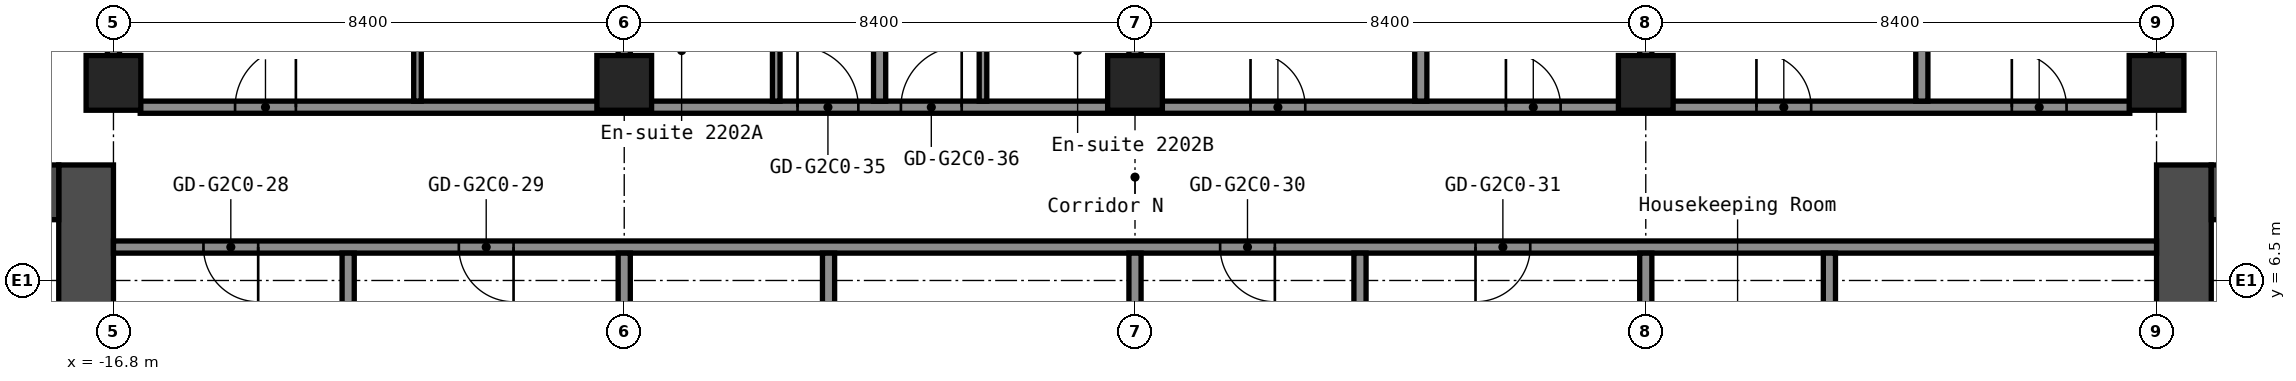
"""IFC4 building model, lengths in metres.
Left out: names, types, materials, properties, quantities, classifications, styles, units other than length and angle.
Written with IfcOpenShell. Run it as: python <this file> out.ifc"""

import sys

from ifc_helpers import new_model, si_unit, direction, frame, frame_2d, origin, origin_2d, place, context, subcontext, project, spatial, rectangle, hollow_rectangle, extrude, element, fill, save


model = new_model("IFC4")
c1 = context("Model", 3, precision=1e-05, world=origin(), true_north=direction((0.0, 1.0)))
c2 = subcontext(c1, "Body", "Model", "MODEL_VIEW")
j1 = project(units=[si_unit("LENGTHUNIT", "METRE"), si_unit("PLANEANGLEUNIT", "RADIAN")], contexts=[c1])
p1 = place(None, origin())
s1 = spatial("IfcSite", under=j1, at=p1, CompositionType="ELEMENT")
p2 = place(p1, origin())
s2 = spatial("IfcBuilding", under=s1, at=p2, CompositionType="ELEMENT")
p3 = place(p2, frame((0.0, 0.0, 81.8)))
s3 = spatial("IfcBuildingStorey", under=s2, at=p3, CompositionType="ELEMENT", Elevation=81.8)
for number, where, z_axis, x_axis in (
    (1, (-16.8, 9.75, 0.0), (0.0, 0.0, 1.0), (1.0, 0.0, 0.0)),
    (2, (-8.4, 9.75, 0.0), (0.0, 0.0, 1.0), (1.0, 0.0, 0.0)),
    (3, (0.0, 9.75, 0.0), (0.0, 0.0, 1.0), (1.0, 0.0, 0.0)),
    (4, (8.4, 9.75, 0.0), (0.0, 0.0, 1.0), (1.0, 0.0, 0.0)),
    (5, (16.8, 9.75, 0.0), (0.0, 0.0, 1.0), (1.0, 0.0, 0.0)),
):
    element("IfcColumn", number, at=place(p3, frame(where, z_axis=z_axis, x_axis=x_axis)), inside=s3, PredefinedType="COLUMN", context=c2, shape_type="SweptSolid", body=[
        extrude(hollow_rectangle(XDim=0.9, YDim=0.9, WallThickness=0.036, at=origin_2d()), origin(), (0.0, 0.0, 1.0), 2.8),
    ])
p4 = place(p3, frame((-17.25, -8.4, 0.0), z_axis=(0.0, 0.0, 1.0), x_axis=(0.0, 1.0, 0.0)))
e6 = element("IfcWall", 6, at=p4, inside=s3, PredefinedType="SHEAR", context=c2, shape_type="SweptSolid", body=[
    extrude(rectangle(XDim=16.8, YDim=0.9, at=frame_2d((8.4, 0.0))), origin(), (0.0, 0.0, 1.0), 2.8),
])
p5 = place(p4, frame((7.6, 0.0, 0.0)))
e7 = element("IfcOpeningElement", 7, at=p5, cuts=e6, PredefinedType="OPENING", context=c2, shape_type="SweptSolid", body=[
    extrude(rectangle(XDim=1.2, YDim=2.1, at=frame_2d((0.6, 1.05))), frame((0.0, 0.46, 0.0), z_axis=(0.0, -1.0, 0.0), x_axis=(1.0, 0.0, 0.0)), (0.0, 0.0, 1.0), 0.92),
])
p6 = place(p3, frame((-32.7, 7.95, 0.0), z_axis=(0.0, 0.0, 1.0), x_axis=(1.0, 0.0, 0.0)))
e8 = element("IfcWall", 8, at=p6, inside=s3, PredefinedType="SHEAR", context=c2, shape_type="SweptSolid", body=[
    extrude(rectangle(XDim=15.0, YDim=0.9, at=frame_2d((7.5, 0.0))), origin(), (0.0, 0.0, 1.0), 2.8),
])
p7 = place(p6, frame((3.4, 0.0, 0.0)))
e9 = element("IfcOpeningElement", 9, at=p7, cuts=e8, PredefinedType="OPENING", context=c2, shape_type="SweptSolid", body=[
    extrude(rectangle(XDim=1.2, YDim=2.1, at=frame_2d((0.6, 1.05))), frame((0.0, 0.46, 0.0), z_axis=(0.0, -1.0, 0.0), x_axis=(1.0, 0.0, 0.0)), (0.0, 0.0, 1.0), 0.92),
])
p8 = place(p6, frame((0.75, 0.0, 0.0)))
e10 = element("IfcOpeningElement", 10, at=p8, cuts=e8, PredefinedType="OPENING", context=c2, shape_type="SweptSolid", body=[
    extrude(rectangle(XDim=0.9, YDim=2.1, at=frame_2d((0.45, 1.05))), frame((0.0, 0.46, 0.0), z_axis=(0.0, -1.0, 0.0), x_axis=(1.0, 0.0, 0.0)), (0.0, 0.0, 1.0), 0.92),
])
p9 = place(p3, frame((17.25, -8.4, 0.0), z_axis=(0.0, 0.0, 1.0), x_axis=(0.0, 1.0, 0.0)))
e11 = element("IfcWall", 11, at=p9, inside=s3, PredefinedType="SHEAR", context=c2, shape_type="SweptSolid", body=[
    extrude(rectangle(XDim=16.8, YDim=0.9, at=frame_2d((8.4, 0.0))), origin(), (0.0, 0.0, 1.0), 2.8),
])
p10 = place(p9, frame((7.6, 0.0, 0.0)))
e12 = element("IfcOpeningElement", 12, at=p10, cuts=e11, PredefinedType="OPENING", context=c2, shape_type="SweptSolid", body=[
    extrude(rectangle(XDim=1.2, YDim=2.1, at=frame_2d((0.6, 1.05))), frame((0.0, 0.46, 0.0), z_axis=(0.0, -1.0, 0.0), x_axis=(1.0, 0.0, 0.0)), (0.0, 0.0, 1.0), 0.92),
])
p11 = place(p3, frame((17.7, 7.95, 0.0), z_axis=(0.0, 0.0, 1.0), x_axis=(1.0, 0.0, 0.0)))
e13 = element("IfcWall", 13, at=p11, inside=s3, PredefinedType="SHEAR", context=c2, shape_type="SweptSolid", body=[
    extrude(rectangle(XDim=15.0, YDim=0.9, at=frame_2d((7.5, 0.0))), origin(), (0.0, 0.0, 1.0), 2.8),
])
p12 = place(p11, frame((10.4, 0.0, 0.0)))
e14 = element("IfcOpeningElement", 14, at=p12, cuts=e13, PredefinedType="OPENING", context=c2, shape_type="SweptSolid", body=[
    extrude(rectangle(XDim=1.2, YDim=2.1, at=frame_2d((0.6, 1.05))), frame((0.0, 0.46, 0.0), z_axis=(0.0, -1.0, 0.0), x_axis=(1.0, 0.0, 0.0)), (0.0, 0.0, 1.0), 0.92),
])
p13 = place(p11, frame((13.35, 0.0, 0.0)))
e15 = element("IfcOpeningElement", 15, at=p13, cuts=e13, PredefinedType="OPENING", context=c2, shape_type="SweptSolid", body=[
    extrude(rectangle(XDim=0.9, YDim=2.1, at=frame_2d((0.45, 1.05))), frame((0.0, 0.46, 0.0), z_axis=(0.0, -1.0, 0.0), x_axis=(1.0, 0.0, 0.0)), (0.0, 0.0, 1.0), 0.92),
])
p14 = place(p3, frame((-16.8, 7.05, 0.0), z_axis=(0.0, 0.0, 1.0), x_axis=(1.0, 0.0, 0.0)))
e16 = element("IfcWall", 16, at=p14, inside=s3, PredefinedType="PARTITIONING", context=c2, shape_type="SweptSolid", body=[
    extrude(rectangle(XDim=33.6, YDim=0.2, at=frame_2d((16.8, 0.0))), origin(), (0.0, 0.0, 1.0), 2.8),
])
p15 = place(p14, frame((1.48, 0.0, 0.0)))
e17 = element("IfcOpeningElement", 17, at=p15, cuts=e16, PredefinedType="OPENING", context=c2, shape_type="SweptSolid", body=[
    extrude(rectangle(XDim=0.9, YDim=2.1, at=frame_2d((0.45, 1.05))), frame((0.0, 0.11, 0.0), z_axis=(0.0, -1.0, 0.0), x_axis=(1.0, 0.0, 0.0)), (0.0, 0.0, 1.0), 0.22),
])
p16 = place(p14, frame((5.68, 0.0, 0.0)))
e18 = element("IfcOpeningElement", 18, at=p16, cuts=e16, PredefinedType="OPENING", context=c2, shape_type="SweptSolid", body=[
    extrude(rectangle(XDim=0.9, YDim=2.1, at=frame_2d((0.45, 1.05))), frame((0.0, 0.11, 0.0), z_axis=(0.0, -1.0, 0.0), x_axis=(1.0, 0.0, 0.0)), (0.0, 0.0, 1.0), 0.22),
])
p17 = place(p14, frame((18.2, 0.0, 0.0)))
e19 = element("IfcOpeningElement", 19, at=p17, cuts=e16, PredefinedType="OPENING", context=c2, shape_type="SweptSolid", body=[
    extrude(rectangle(XDim=0.9, YDim=2.1, at=frame_2d((0.45, 1.05))), frame((0.0, 0.11, 0.0), z_axis=(0.0, -1.0, 0.0), x_axis=(1.0, 0.0, 0.0)), (0.0, 0.0, 1.0), 0.22),
])
p18 = place(p14, frame((22.4, 0.0, 0.0)))
e20 = element("IfcOpeningElement", 20, at=p18, cuts=e16, PredefinedType="OPENING", context=c2, shape_type="SweptSolid", body=[
    extrude(rectangle(XDim=0.9, YDim=2.1, at=frame_2d((0.45, 1.05))), frame((0.0, 0.11, 0.0), z_axis=(0.0, -1.0, 0.0), x_axis=(1.0, 0.0, 0.0)), (0.0, 0.0, 1.0), 0.22),
])
p19 = place(p3, frame((-16.36, 9.35, 0.0), z_axis=(0.0, 0.0, 1.0), x_axis=(1.0, 0.0, 0.0)))
e21 = element("IfcWall", 21, at=p19, inside=s3, PredefinedType="PARTITIONING", context=c2, shape_type="SweptSolid", body=[
    extrude(rectangle(XDim=32.72, YDim=0.2, at=frame_2d((16.36, 0.0))), origin(), (0.0, 0.0, 1.0), 2.8),
])
p20 = place(p19, frame((1.56, 0.0, 0.0)))
e22 = element("IfcOpeningElement", 22, at=p20, cuts=e21, PredefinedType="OPENING", context=c2, shape_type="SweptSolid", body=[
    extrude(rectangle(XDim=1.0, YDim=2.1, at=frame_2d((0.5, 1.05))), frame((0.0, 0.11, 0.0), z_axis=(0.0, -1.0, 0.0), x_axis=(1.0, 0.0, 0.0)), (0.0, 0.0, 1.0), 0.22),
])
p21 = place(p19, frame((10.81, 0.0, 0.0)))
e23 = element("IfcOpeningElement", 23, at=p21, cuts=e21, PredefinedType="OPENING", context=c2, shape_type="SweptSolid", body=[
    extrude(rectangle(XDim=1.0, YDim=2.1, at=frame_2d((0.5, 1.05))), frame((0.0, 0.11, 0.0), z_axis=(0.0, -1.0, 0.0), x_axis=(1.0, 0.0, 0.0)), (0.0, 0.0, 1.0), 0.22),
])
p22 = place(p19, frame((12.51, 0.0, 0.0)))
e24 = element("IfcOpeningElement", 24, at=p22, cuts=e21, PredefinedType="OPENING", context=c2, shape_type="SweptSolid", body=[
    extrude(rectangle(XDim=1.0, YDim=2.1, at=frame_2d((0.5, 1.05))), frame((0.0, 0.11, 0.0), z_axis=(0.0, -1.0, 0.0), x_axis=(1.0, 0.0, 0.0)), (0.0, 0.0, 1.0), 0.22),
])
p23 = place(p19, frame((18.26, 0.0, 0.0)))
e25 = element("IfcOpeningElement", 25, at=p23, cuts=e21, PredefinedType="OPENING", context=c2, shape_type="SweptSolid", body=[
    extrude(rectangle(XDim=0.9, YDim=2.1, at=frame_2d((0.45, 1.05))), frame((0.0, 0.11, 0.0), z_axis=(0.0, -1.0, 0.0), x_axis=(1.0, 0.0, 0.0)), (0.0, 0.0, 1.0), 0.22),
])
p24 = place(p19, frame((22.46, 0.0, 0.0)))
e26 = element("IfcOpeningElement", 26, at=p24, cuts=e21, PredefinedType="OPENING", context=c2, shape_type="SweptSolid", body=[
    extrude(rectangle(XDim=0.9, YDim=2.1, at=frame_2d((0.45, 1.05))), frame((0.0, 0.11, 0.0), z_axis=(0.0, -1.0, 0.0), x_axis=(1.0, 0.0, 0.0)), (0.0, 0.0, 1.0), 0.22),
])
p25 = place(p19, frame((26.58, 0.0, 0.0)))
e27 = element("IfcOpeningElement", 27, at=p25, cuts=e21, PredefinedType="OPENING", context=c2, shape_type="SweptSolid", body=[
    extrude(rectangle(XDim=0.9, YDim=2.1, at=frame_2d((0.45, 1.05))), frame((0.0, 0.11, 0.0), z_axis=(0.0, -1.0, 0.0), x_axis=(1.0, 0.0, 0.0)), (0.0, 0.0, 1.0), 0.22),
])
p26 = place(p19, frame((30.78, 0.0, 0.0)))
e28 = element("IfcOpeningElement", 28, at=p26, cuts=e21, PredefinedType="OPENING", context=c2, shape_type="SweptSolid", body=[
    extrude(rectangle(XDim=0.9, YDim=2.1, at=frame_2d((0.45, 1.05))), frame((0.0, 0.11, 0.0), z_axis=(0.0, -1.0, 0.0), x_axis=(1.0, 0.0, 0.0)), (0.0, 0.0, 1.0), 0.22),
])
p27 = place(p3, frame((-16.8, 10.19, 0.0), z_axis=(0.0, 0.0, 1.0), x_axis=(0.0, 1.0, 0.0)))
e29 = element("IfcWall", 29, at=p27, inside=s3, PredefinedType="PARTITIONING", context=c2, shape_type="SweptSolid", body=[
    extrude(rectangle(XDim=13.36, YDim=0.2, at=frame_2d((6.68, 0.0))), origin(), (0.0, 0.0, 1.0), 2.8),
])
p28 = place(p3, frame((-12.94, 1.05, 0.0), z_axis=(0.0, 0.0, 1.0), x_axis=(0.0, 1.0, 0.0)))
e30 = element("IfcWall", 30, at=p28, inside=s3, PredefinedType="PARTITIONING", context=c2, shape_type="SweptSolid", body=[
    extrude(rectangle(XDim=5.9, YDim=0.2, at=frame_2d((2.95, 0.0))), origin(), (0.0, 0.0, 1.0), 2.8),
])
p29 = place(p3, frame((-11.8, 9.45, 0.0), z_axis=(0.0, 0.0, 1.0), x_axis=(0.0, 1.0, 0.0)))
e31 = element("IfcWall", 31, at=p29, inside=s3, PredefinedType="PARTITIONING", context=c2, shape_type="SweptSolid", body=[
    extrude(rectangle(XDim=3.3, YDim=0.125, at=frame_2d((1.65, 0.0))), origin(), (0.0, 0.0, 1.0), 2.8),
])
p30 = place(p3, frame((-8.4, 1.05, 0.0), z_axis=(0.0, 0.0, 1.0), x_axis=(0.0, 1.0, 0.0)))
e32 = element("IfcWall", 32, at=p30, inside=s3, PredefinedType="PARTITIONING", context=c2, shape_type="SweptSolid", body=[
    extrude(rectangle(XDim=5.9, YDim=0.2, at=frame_2d((2.95, 0.0))), origin(), (0.0, 0.0, 1.0), 2.8),
])
p31 = place(p3, frame((-8.4, 10.19, 0.0), z_axis=(0.0, 0.0, 1.0), x_axis=(0.0, 1.0, 0.0)))
e33 = element("IfcWall", 33, at=p31, inside=s3, PredefinedType="PARTITIONING", context=c2, shape_type="SweptSolid", body=[
    extrude(rectangle(XDim=13.36, YDim=0.2, at=frame_2d((6.68, 0.0))), origin(), (0.0, 0.0, 1.0), 2.8),
])
p32 = place(p3, frame((-5.9, 9.45, 0.0), z_axis=(0.0, 0.0, 1.0), x_axis=(0.0, 1.0, 0.0)))
e34 = element("IfcWall", 34, at=p32, inside=s3, PredefinedType="PARTITIONING", context=c2, shape_type="SweptSolid", body=[
    extrude(rectangle(XDim=2.9, YDim=0.125, at=frame_2d((1.45, 0.0))), origin(), (0.0, 0.0, 1.0), 2.8),
])
p33 = place(p32, frame((1.5, 0.0, 0.0)))
e35 = element("IfcOpeningElement", 35, at=p33, cuts=e34, PredefinedType="OPENING", context=c2, shape_type="SweptSolid", body=[
    extrude(rectangle(XDim=0.8, YDim=2.1, at=frame_2d((0.4, 1.05))), frame((0.0, 0.073, 0.0), z_axis=(0.0, -1.0, 0.0), x_axis=(1.0, 0.0, 0.0)), (0.0, 0.0, 1.0), 0.145),
])
p34 = place(p3, frame((-5.04, 1.05, 0.0), z_axis=(0.0, 0.0, 1.0), x_axis=(0.0, 1.0, 0.0)))
e36 = element("IfcWall", 36, at=p34, inside=s3, PredefinedType="PARTITIONING", context=c2, shape_type="SweptSolid", body=[
    extrude(rectangle(XDim=5.9, YDim=0.2, at=frame_2d((2.95, 0.0))), origin(), (0.0, 0.0, 1.0), 2.8),
])
p35 = place(p3, frame((-4.2, 9.45, 0.0), z_axis=(0.0, 0.0, 1.0), x_axis=(0.0, 1.0, 0.0)))
e37 = element("IfcWall", 37, at=p35, inside=s3, PredefinedType="PARTITIONING", context=c2, shape_type="SweptSolid", body=[
    extrude(rectangle(XDim=14.1, YDim=0.2, at=frame_2d((7.05, 0.0))), origin(), (0.0, 0.0, 1.0), 2.8),
])
p36 = place(p3, frame((-2.5, 9.45, 0.0), z_axis=(0.0, 0.0, 1.0), x_axis=(0.0, 1.0, 0.0)))
e38 = element("IfcWall", 38, at=p36, inside=s3, PredefinedType="PARTITIONING", context=c2, shape_type="SweptSolid", body=[
    extrude(rectangle(XDim=2.9, YDim=0.125, at=frame_2d((1.45, 0.0))), origin(), (0.0, 0.0, 1.0), 2.8),
])
p37 = place(p36, frame((1.5, 0.0, 0.0)))
e39 = element("IfcOpeningElement", 39, at=p37, cuts=e38, PredefinedType="OPENING", context=c2, shape_type="SweptSolid", body=[
    extrude(rectangle(XDim=0.8, YDim=2.1, at=frame_2d((0.4, 1.05))), frame((0.0, 0.073, 0.0), z_axis=(0.0, -1.0, 0.0), x_axis=(1.0, 0.0, 0.0)), (0.0, 0.0, 1.0), 0.145),
])
p38 = place(p3, frame((0.0, 1.05, 0.0), z_axis=(0.0, 0.0, 1.0), x_axis=(0.0, 1.0, 0.0)))
e40 = element("IfcWall", 40, at=p38, inside=s3, PredefinedType="PARTITIONING", context=c2, shape_type="SweptSolid", body=[
    extrude(rectangle(XDim=5.9, YDim=0.2, at=frame_2d((2.95, 0.0))), origin(), (0.0, 0.0, 1.0), 2.8),
])
p39 = place(p3, frame((0.0, 10.19, 0.0), z_axis=(0.0, 0.0, 1.0), x_axis=(0.0, 1.0, 0.0)))
e41 = element("IfcWall", 41, at=p39, inside=s3, PredefinedType="PARTITIONING", context=c2, shape_type="SweptSolid", body=[
    extrude(rectangle(XDim=13.36, YDim=0.2, at=frame_2d((6.68, 0.0))), origin(), (0.0, 0.0, 1.0), 2.8),
])
p40 = place(p3, frame((3.7, 1.05, 0.0), z_axis=(0.0, 0.0, 1.0), x_axis=(0.0, 1.0, 0.0)))
e42 = element("IfcWall", 42, at=p40, inside=s3, PredefinedType="PARTITIONING", context=c2, shape_type="SweptSolid", body=[
    extrude(rectangle(XDim=5.9, YDim=0.2, at=frame_2d((2.95, 0.0))), origin(), (0.0, 0.0, 1.0), 2.8),
])
p41 = place(p3, frame((4.7, 9.45, 0.0), z_axis=(0.0, 0.0, 1.0), x_axis=(0.0, 1.0, 0.0)))
e43 = element("IfcWall", 43, at=p41, inside=s3, PredefinedType="PARTITIONING", context=c2, shape_type="SweptSolid", body=[
    extrude(rectangle(XDim=14.1, YDim=0.2, at=frame_2d((7.05, 0.0))), origin(), (0.0, 0.0, 1.0), 2.8),
])
p42 = place(p3, frame((8.4, 1.05, 0.0), z_axis=(0.0, 0.0, 1.0), x_axis=(0.0, 1.0, 0.0)))
e44 = element("IfcWall", 44, at=p42, inside=s3, PredefinedType="PARTITIONING", context=c2, shape_type="SweptSolid", body=[
    extrude(rectangle(XDim=5.9, YDim=0.2, at=frame_2d((2.95, 0.0))), origin(), (0.0, 0.0, 1.0), 2.8),
])
p43 = place(p3, frame((8.4, 10.19, 0.0), z_axis=(0.0, 0.0, 1.0), x_axis=(0.0, 1.0, 0.0)))
e45 = element("IfcWall", 45, at=p43, inside=s3, PredefinedType="PARTITIONING", context=c2, shape_type="SweptSolid", body=[
    extrude(rectangle(XDim=13.36, YDim=0.2, at=frame_2d((6.68, 0.0))), origin(), (0.0, 0.0, 1.0), 2.8),
])
p44 = place(p3, frame((11.42, 1.05, 0.0), z_axis=(0.0, 0.0, 1.0), x_axis=(0.0, 1.0, 0.0)))
e46 = element("IfcWall", 46, at=p44, inside=s3, PredefinedType="PARTITIONING", context=c2, shape_type="SweptSolid", body=[
    extrude(rectangle(XDim=5.9, YDim=0.2, at=frame_2d((2.95, 0.0))), origin(), (0.0, 0.0, 1.0), 2.8),
])
p45 = place(p3, frame((12.94, 9.45, 0.0), z_axis=(0.0, 0.0, 1.0), x_axis=(0.0, 1.0, 0.0)))
e47 = element("IfcWall", 47, at=p45, inside=s3, PredefinedType="PARTITIONING", context=c2, shape_type="SweptSolid", body=[
    extrude(rectangle(XDim=14.1, YDim=0.2, at=frame_2d((7.05, 0.0))), origin(), (0.0, 0.0, 1.0), 2.8),
])
p46 = place(p3, frame((16.8, 10.19, 0.0), z_axis=(0.0, 0.0, 1.0), x_axis=(0.0, 1.0, 0.0)))
e48 = element("IfcWall", 48, at=p46, inside=s3, PredefinedType="PARTITIONING", context=c2, shape_type="SweptSolid", body=[
    extrude(rectangle(XDim=13.36, YDim=0.2, at=frame_2d((6.68, 0.0))), origin(), (0.0, 0.0, 1.0), 2.8),
])
p47 = place(p15, origin())
e49 = element("IfcDoor", 49, at=p47, inside=s3, OperationType="SINGLE_SWING_RIGHT", PredefinedType="DOOR", context=c2, shape_type="SweptSolid", body=[
    extrude(rectangle(XDim=0.9, YDim=2.1, at=frame_2d((0.45, 1.05))), frame((0.0, 0.025, 0.0), z_axis=(0.0, -1.0, 0.0), x_axis=(1.0, 0.0, 0.0)), (0.0, 0.0, 1.0), 0.05),
])
fill(e17, e49)
p48 = place(p16, origin())
e50 = element("IfcDoor", 50, at=p48, inside=s3, OperationType="SINGLE_SWING_RIGHT", PredefinedType="DOOR", context=c2, shape_type="SweptSolid", body=[
    extrude(rectangle(XDim=0.9, YDim=2.1, at=frame_2d((0.45, 1.05))), frame((0.0, 0.025, 0.0), z_axis=(0.0, -1.0, 0.0), x_axis=(1.0, 0.0, 0.0)), (0.0, 0.0, 1.0), 0.05),
])
fill(e18, e50)
p49 = place(p17, origin())
e51 = element("IfcDoor", 51, at=p49, inside=s3, OperationType="SINGLE_SWING_RIGHT", PredefinedType="DOOR", context=c2, shape_type="SweptSolid", body=[
    extrude(rectangle(XDim=0.9, YDim=2.1, at=frame_2d((0.45, 1.05))), frame((0.0, 0.025, 0.0), z_axis=(0.0, -1.0, 0.0), x_axis=(1.0, 0.0, 0.0)), (0.0, 0.0, 1.0), 0.05),
])
fill(e19, e51)
p50 = place(p18, origin())
e52 = element("IfcDoor", 52, at=p50, inside=s3, OperationType="SINGLE_SWING_LEFT", PredefinedType="DOOR", context=c2, shape_type="SweptSolid", body=[
    extrude(rectangle(XDim=0.9, YDim=2.1, at=frame_2d((0.45, 1.05))), frame((0.0, 0.025, 0.0), z_axis=(0.0, -1.0, 0.0), x_axis=(1.0, 0.0, 0.0)), (0.0, 0.0, 1.0), 0.05),
])
fill(e20, e52)
p51 = place(p20, origin())
e53 = element("IfcDoor", 53, at=p51, inside=s3, OperationType="SINGLE_SWING_LEFT", PredefinedType="DOOR", context=c2, shape_type="SweptSolid", body=[
    extrude(rectangle(XDim=1.0, YDim=2.1, at=frame_2d((0.5, 1.05))), frame((0.0, 0.025, 0.0), z_axis=(0.0, -1.0, 0.0), x_axis=(1.0, 0.0, 0.0)), (0.0, 0.0, 1.0), 0.05),
])
fill(e22, e53)
p52 = place(p21, origin())
e54 = element("IfcDoor", 54, at=p52, inside=s3, OperationType="SINGLE_SWING_RIGHT", PredefinedType="DOOR", context=c2, shape_type="SweptSolid", body=[
    extrude(rectangle(XDim=1.0, YDim=2.1, at=frame_2d((0.5, 1.05))), frame((0.0, 0.025, 0.0), z_axis=(0.0, -1.0, 0.0), x_axis=(1.0, 0.0, 0.0)), (0.0, 0.0, 1.0), 0.05),
])
fill(e23, e54)
p53 = place(p22, origin())
e55 = element("IfcDoor", 55, at=p53, inside=s3, OperationType="SINGLE_SWING_LEFT", PredefinedType="DOOR", context=c2, shape_type="SweptSolid", body=[
    extrude(rectangle(XDim=1.0, YDim=2.1, at=frame_2d((0.5, 1.05))), frame((0.0, 0.025, 0.0), z_axis=(0.0, -1.0, 0.0), x_axis=(1.0, 0.0, 0.0)), (0.0, 0.0, 1.0), 0.05),
])
fill(e24, e55)
p54 = place(p23, origin())
e56 = element("IfcDoor", 56, at=p54, inside=s3, OperationType="SINGLE_SWING_RIGHT", PredefinedType="DOOR", context=c2, shape_type="SweptSolid", body=[
    extrude(rectangle(XDim=0.9, YDim=2.1, at=frame_2d((0.45, 1.05))), frame((0.0, 0.025, 0.0), z_axis=(0.0, -1.0, 0.0), x_axis=(1.0, 0.0, 0.0)), (0.0, 0.0, 1.0), 0.05),
])
fill(e25, e56)
p55 = place(p24, origin())
e57 = element("IfcDoor", 57, at=p55, inside=s3, OperationType="SINGLE_SWING_RIGHT", PredefinedType="DOOR", context=c2, shape_type="SweptSolid", body=[
    extrude(rectangle(XDim=0.9, YDim=2.1, at=frame_2d((0.45, 1.05))), frame((0.0, 0.025, 0.0), z_axis=(0.0, -1.0, 0.0), x_axis=(1.0, 0.0, 0.0)), (0.0, 0.0, 1.0), 0.05),
])
fill(e26, e57)
p56 = place(p25, origin())
e58 = element("IfcDoor", 58, at=p56, inside=s3, OperationType="SINGLE_SWING_RIGHT", PredefinedType="DOOR", context=c2, shape_type="SweptSolid", body=[
    extrude(rectangle(XDim=0.9, YDim=2.1, at=frame_2d((0.45, 1.05))), frame((0.0, 0.025, 0.0), z_axis=(0.0, -1.0, 0.0), x_axis=(1.0, 0.0, 0.0)), (0.0, 0.0, 1.0), 0.05),
])
fill(e27, e58)
p57 = place(p26, origin())
e59 = element("IfcDoor", 59, at=p57, inside=s3, OperationType="SINGLE_SWING_RIGHT", PredefinedType="DOOR", context=c2, shape_type="SweptSolid", body=[
    extrude(rectangle(XDim=0.9, YDim=2.1, at=frame_2d((0.45, 1.05))), frame((0.0, 0.025, 0.0), z_axis=(0.0, -1.0, 0.0), x_axis=(1.0, 0.0, 0.0)), (0.0, 0.0, 1.0), 0.05),
])
fill(e28, e59)
save(model, sys.argv[1])
